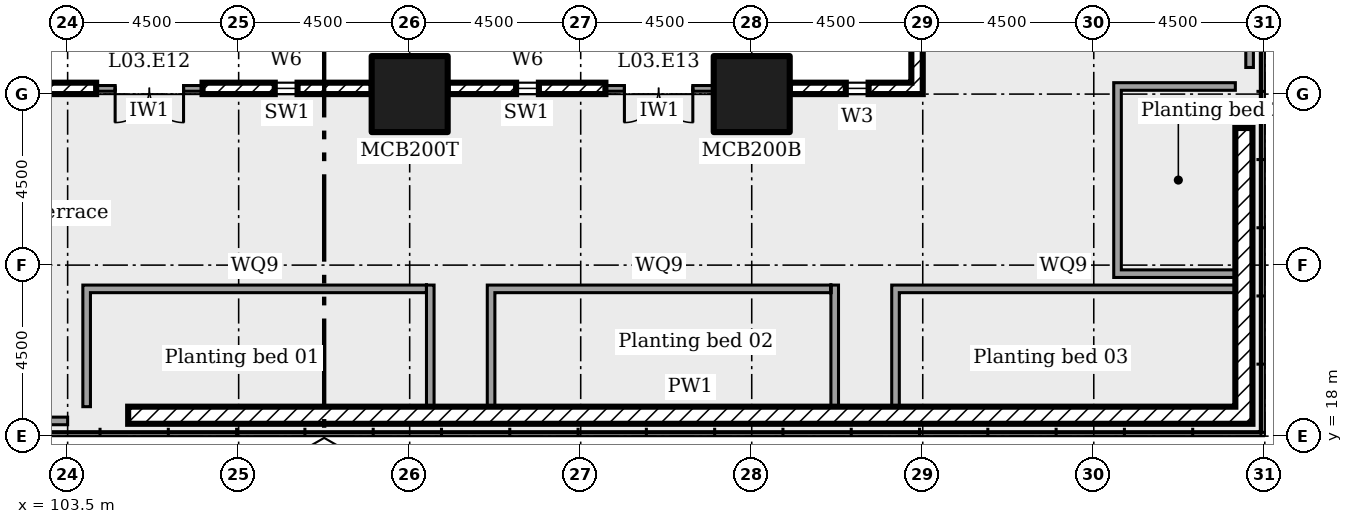
"""IFC4 building model, lengths in metres.
Left out: names, types, materials, properties, quantities, classifications, styles, units other than length and angle.
Written with IfcOpenShell. Run it as: python <this file> out.ifc"""

import sys

from ifc_helpers import new_model, si_unit, direction, frame, frame_2d, origin, origin_2d, place, context, subcontext, project, spatial, rectangle, extrude, element, fill, save


model = new_model("IFC4")
c1 = context("Model", 3, precision=1e-05, world=origin(), true_north=direction((0.0, 1.0)))
c2 = subcontext(c1, "Body", "Model", "MODEL_VIEW")
j1 = project(units=[si_unit("LENGTHUNIT", "METRE"), si_unit("PLANEANGLEUNIT", "RADIAN")], contexts=[c1])
p1 = place(None, origin())
s1 = spatial("IfcSite", under=j1, at=p1, CompositionType="ELEMENT")
p2 = place(p1, origin())
s2 = spatial("IfcBuilding", under=s1, at=p2, CompositionType="ELEMENT")
p3 = place(p2, frame((0.0, 0.0, 16.5)))
s3 = spatial("IfcBuildingStorey", under=s2, at=p3, CompositionType="ELEMENT", Elevation=16.5)
for number, where in (
    (1, (112.5, 27.0, 0.0)),
    (2, (121.5, 27.0, 0.0)),
):
    element("IfcColumn", number, at=place(p3, frame(where)), inside=s3, PredefinedType="COLUMN", context=c2, shape_type="SweptSolid", body=[
        extrude(rectangle(XDim=2.0, YDim=2.0, at=origin_2d()), origin(), (0.0, 0.0, 1.0), 4.5),
    ])
p4 = place(p3, frame((100.0, 27.15, 0.0)))
e3 = element("IfcWall", 3, at=p4, inside=s3, PredefinedType="ELEMENTEDWALL", context=c2, shape_type="SweptSolid", body=[
    extrude(rectangle(XDim=4.25, YDim=0.3, at=frame_2d((2.125, 0.0))), origin(), (0.0, 0.0, 1.0), 2.25),
])
p5 = place(p4, frame((1.85, 0.0, 0.45)))
e4 = element("IfcOpeningElement", 4, at=p5, cuts=e3, PredefinedType="OPENING", context=c2, shape_type="SweptSolid", body=[
    extrude(rectangle(XDim=0.6, YDim=1.7, at=frame_2d((0.3, 0.85))), frame((0.0, 0.16, 0.0), z_axis=(0.0, -1.0, 0.0), x_axis=(1.0, 0.0, 0.0)), (0.0, 0.0, 1.0), 0.32),
])
p6 = place(p3, frame((104.25, 27.15, 0.0)))
e5 = element("IfcWall", 5, at=p6, inside=s3, PredefinedType="SOLIDWALL", context=c2, shape_type="SweptSolid", body=[
    extrude(rectangle(XDim=2.8, YDim=0.15, at=frame_2d((1.4, 0.0))), origin(), (0.0, 0.0, 1.0), 2.25),
])
p7 = place(p6, frame((0.5, 0.0, 0.0)))
e6 = element("IfcOpeningElement", 6, at=p7, cuts=e5, PredefinedType="OPENING", context=c2, shape_type="SweptSolid", body=[
    extrude(rectangle(XDim=1.8, YDim=2.1, at=frame_2d((0.9, 1.05))), frame((0.0, 0.085, 0.0), z_axis=(0.0, -1.0, 0.0), x_axis=(1.0, 0.0, 0.0)), (0.0, 0.0, 1.0), 0.17),
])
p8 = place(p3, frame((107.05, 27.15, 0.0)))
e7 = element("IfcWall", 7, at=p8, inside=s3, PredefinedType="ELEMENTEDWALL", context=c2, shape_type="SweptSolid", body=[
    extrude(rectangle(XDim=4.45, YDim=0.3, at=frame_2d((2.225, 0.0))), origin(), (0.0, 0.0, 1.0), 2.25),
])
p9 = place(p8, frame((1.9, 0.0, 0.45)))
e8 = element("IfcOpeningElement", 8, at=p9, cuts=e7, PredefinedType="OPENING", context=c2, shape_type="SweptSolid", body=[
    extrude(rectangle(XDim=0.6, YDim=1.7, at=frame_2d((0.3, 0.85))), frame((0.0, 0.16, 0.0), z_axis=(0.0, -1.0, 0.0), x_axis=(1.0, 0.0, 0.0)), (0.0, 0.0, 1.0), 0.32),
])
p10 = place(p3, frame((113.5, 27.15, 0.0)))
e9 = element("IfcWall", 9, at=p10, inside=s3, PredefinedType="ELEMENTEDWALL", context=c2, shape_type="SweptSolid", body=[
    extrude(rectangle(XDim=4.15, YDim=0.3, at=frame_2d((2.075, 0.0))), origin(), (0.0, 0.0, 1.0), 2.25),
])
p11 = place(p10, frame((1.8, 0.0, 0.45)))
e10 = element("IfcOpeningElement", 10, at=p11, cuts=e9, PredefinedType="OPENING", context=c2, shape_type="SweptSolid", body=[
    extrude(rectangle(XDim=0.6, YDim=1.7, at=frame_2d((0.3, 0.85))), frame((0.0, 0.16, 0.0), z_axis=(0.0, -1.0, 0.0), x_axis=(1.0, 0.0, 0.0)), (0.0, 0.0, 1.0), 0.32),
])
p12 = place(p3, frame((117.65, 27.15, 0.0)))
e11 = element("IfcWall", 11, at=p12, inside=s3, PredefinedType="SOLIDWALL", context=c2, shape_type="SweptSolid", body=[
    extrude(rectangle(XDim=2.85, YDim=0.15, at=frame_2d((1.425, 0.0))), origin(), (0.0, 0.0, 1.0), 2.25),
])
p13 = place(p12, frame((0.5, 0.0, 0.0)))
e12 = element("IfcOpeningElement", 12, at=p13, cuts=e11, PredefinedType="OPENING", context=c2, shape_type="SweptSolid", body=[
    extrude(rectangle(XDim=1.8, YDim=2.1, at=frame_2d((0.9, 1.05))), frame((0.0, 0.085, 0.0), z_axis=(0.0, -1.0, 0.0), x_axis=(1.0, 0.0, 0.0)), (0.0, 0.0, 1.0), 0.17),
])
p14 = place(p3, frame((122.5, 27.15, 0.0)))
e13 = element("IfcWall", 13, at=p14, inside=s3, PredefinedType="ELEMENTEDWALL", context=c2, shape_type="SweptSolid", body=[
    extrude(rectangle(XDim=3.2, YDim=0.3, at=frame_2d((1.6, 0.0))), origin(), (0.0, 0.0, 1.0), 4.05),
])
p15 = place(p14, frame((1.475, 0.0, 0.45)))
e14 = element("IfcOpeningElement", 14, at=p15, cuts=e13, PredefinedType="OPENING", context=c2, shape_type="SweptSolid", body=[
    extrude(rectangle(XDim=0.6, YDim=2.4, at=frame_2d((0.3, 1.2))), frame((0.0, 0.16, 0.0), z_axis=(0.0, -1.0, 0.0), x_axis=(1.0, 0.0, 0.0)), (0.0, 0.0, 1.0), 0.32),
])
p16 = place(p3, frame((125.85, 27.0, 0.0), z_axis=(0.0, 0.0, 1.0), x_axis=(0.0, 1.0, 0.0)))
e15 = element("IfcWall", 15, at=p16, inside=s3, PredefinedType="ELEMENTEDWALL", context=c2, shape_type="SweptSolid", body=[
    extrude(rectangle(XDim=3.5, YDim=0.3, at=frame_2d((1.75, 0.0))), origin(), (0.0, 0.0, 1.0), 4.05),
])
p17 = place(p16, frame((1.575, 0.0, 0.45)))
e16 = element("IfcOpeningElement", 16, at=p17, cuts=e15, PredefinedType="OPENING", context=c2, shape_type="SweptSolid", body=[
    extrude(rectangle(XDim=0.6, YDim=2.4, at=frame_2d((0.3, 1.2))), frame((0.0, 0.16, 0.0), z_axis=(0.0, -1.0, 0.0), x_axis=(1.0, 0.0, 0.0)), (0.0, 0.0, 1.0), 0.32),
])
p18 = place(p3, frame((105.093, 18.55, 0.0)))
e17 = element("IfcWall", 17, at=p18, inside=s3, PredefinedType="SOLIDWALL", context=c2, shape_type="SweptSolid", body=[
    extrude(rectangle(XDim=29.583, YDim=0.45, at=frame_2d((14.791, 0.0))), origin(), (0.0, 0.0, 1.0), 0.6),
])
p19 = place(p3, frame((134.45, 18.775, 0.0), z_axis=(0.0, 0.0, 1.0), x_axis=(0.0, 1.0, 0.0)))
e18 = element("IfcWall", 18, at=p19, inside=s3, PredefinedType="SOLIDWALL", context=c2, shape_type="SweptSolid", body=[
    extrude(rectangle(XDim=7.333, YDim=0.45, at=frame_2d((3.666, 0.0))), origin(), (0.0, 0.0, 1.0), 0.6),
])
p20 = place(p3, frame((113.042, 18.775, 0.0), z_axis=(0.0, 0.0, 1.0), x_axis=(0.0, 1.0, 0.0)))
e19 = element("IfcWall", 19, at=p20, inside=s3, PredefinedType="SOLIDWALL", context=c2, shape_type="SweptSolid", body=[
    extrude(rectangle(XDim=3.2, YDim=0.2, at=frame_2d((1.6, 0.0))), origin(), (0.0, 0.0, 1.0), 0.45),
])
p21 = place(p3, frame((103.9, 21.875, 0.0)))
e20 = element("IfcWall", 20, at=p21, inside=s3, PredefinedType="SOLIDWALL", context=c2, shape_type="SweptSolid", body=[
    extrude(rectangle(XDim=9.042, YDim=0.2, at=frame_2d((4.521, 0.0))), origin(), (0.0, 0.0, 1.0), 0.45),
])
p22 = place(p3, frame((104.0, 18.775, 0.0), z_axis=(0.0, 0.0, 1.0), x_axis=(0.0, 1.0, 0.0)))
e21 = element("IfcWall", 21, at=p22, inside=s3, PredefinedType="SOLIDWALL", context=c2, shape_type="SweptSolid", body=[
    extrude(rectangle(XDim=3.0, YDim=0.2, at=frame_2d((1.5, 0.0))), origin(), (0.0, 0.0, 1.0), 0.45),
])
p23 = place(p3, frame((123.683, 18.775, 0.0), z_axis=(0.0, 0.0, 1.0), x_axis=(0.0, 1.0, 0.0)))
e22 = element("IfcWall", 22, at=p23, inside=s3, PredefinedType="SOLIDWALL", context=c2, shape_type="SweptSolid", body=[
    extrude(rectangle(XDim=3.2, YDim=0.2, at=frame_2d((1.6, 0.0))), origin(), (0.0, 0.0, 1.0), 0.45),
])
p24 = place(p3, frame((114.542, 21.875, 0.0)))
e23 = element("IfcWall", 23, at=p24, inside=s3, PredefinedType="SOLIDWALL", context=c2, shape_type="SweptSolid", body=[
    extrude(rectangle(XDim=9.042, YDim=0.2, at=frame_2d((4.521, 0.0))), origin(), (0.0, 0.0, 1.0), 0.45),
])
p25 = place(p3, frame((114.642, 18.775, 0.0), z_axis=(0.0, 0.0, 1.0), x_axis=(0.0, 1.0, 0.0)))
e24 = element("IfcWall", 24, at=p25, inside=s3, PredefinedType="SOLIDWALL", context=c2, shape_type="SweptSolid", body=[
    extrude(rectangle(XDim=3.0, YDim=0.2, at=frame_2d((1.5, 0.0))), origin(), (0.0, 0.0, 1.0), 0.45),
])
p26 = place(p3, frame((125.183, 21.875, 0.0)))
e25 = element("IfcWall", 25, at=p26, inside=s3, PredefinedType="SOLIDWALL", context=c2, shape_type="SweptSolid", body=[
    extrude(rectangle(XDim=9.042, YDim=0.2, at=frame_2d((4.521, 0.0))), origin(), (0.0, 0.0, 1.0), 0.45),
])
p27 = place(p3, frame((125.283, 18.775, 0.0), z_axis=(0.0, 0.0, 1.0), x_axis=(0.0, 1.0, 0.0)))
e26 = element("IfcWall", 26, at=p27, inside=s3, PredefinedType="SOLIDWALL", context=c2, shape_type="SweptSolid", body=[
    extrude(rectangle(XDim=3.0, YDim=0.2, at=frame_2d((1.5, 0.0))), origin(), (0.0, 0.0, 1.0), 0.45),
])
for number, where in (
    (27, (131.025, 27.2, 0.0)),
    (28, (131.025, 22.275, 0.0)),
):
    element("IfcWall", number, at=place(p3, frame(where)), inside=s3, PredefinedType="SOLIDWALL", context=c2, shape_type="SweptSolid", body=[
        extrude(rectangle(XDim=3.2, YDim=0.2, at=frame_2d((1.6, 0.0))), origin(), (0.0, 0.0, 1.0), 0.45),
    ])
p28 = place(p3, frame((131.125, 22.375, 0.0), z_axis=(0.0, 0.0, 1.0), x_axis=(0.0, 1.0, 0.0)))
e29 = element("IfcWall", 29, at=p28, inside=s3, PredefinedType="SOLIDWALL", context=c2, shape_type="SweptSolid", body=[
    extrude(rectangle(XDim=4.725, YDim=0.2, at=frame_2d((2.363, 0.0))), origin(), (0.0, 0.0, 1.0), 0.45),
])
p29 = place(p3, frame((99.7, 18.4, 0.0)))
e30 = element("IfcWall", 30, at=p29, inside=s3, PredefinedType="SOLIDWALL", context=c2, shape_type="SweptSolid", body=[
    extrude(rectangle(XDim=3.8, YDim=0.2, at=frame_2d((1.9, 0.0))), origin(), (0.0, 0.0, 1.0), 2.3),
])
p30 = place(p29, frame((0.6, 0.0, 0.0)))
e31 = element("IfcOpeningElement", 31, at=p30, cuts=e30, PredefinedType="OPENING", context=c2, shape_type="SweptSolid", body=[
    extrude(rectangle(XDim=2.6, YDim=2.1, at=frame_2d((1.3, 1.05))), frame((0.0, 0.11, 0.0), z_axis=(0.0, -1.0, 0.0), x_axis=(1.0, 0.0, 0.0)), (0.0, 0.0, 1.0), 0.22),
])
p31 = place(p3, frame((134.6, 27.7, 0.0), z_axis=(0.0, 0.0, 1.0), x_axis=(0.0, 1.0, 0.0)))
e32 = element("IfcWall", 32, at=p31, inside=s3, PredefinedType="SOLIDWALL", context=c2, shape_type="SweptSolid", body=[
    extrude(rectangle(XDim=3.8, YDim=0.2, at=frame_2d((1.9, 0.0))), origin(), (0.0, 0.0, 1.0), 2.3),
])
p32 = place(p31, frame((0.6, 0.0, 0.0)))
e33 = element("IfcOpeningElement", 33, at=p32, cuts=e32, PredefinedType="OPENING", context=c2, shape_type="SweptSolid", body=[
    extrude(rectangle(XDim=2.6, YDim=2.1, at=frame_2d((1.3, 1.05))), frame((0.0, 0.11, 0.0), z_axis=(0.0, -1.0, 0.0), x_axis=(1.0, 0.0, 0.0)), (0.0, 0.0, 1.0), 0.22),
])
p33 = place(p7, frame((1.8, 0.0, 0.0), x_axis=(-1.0, 0.0, 0.0)))
e34 = element("IfcDoor", 34, at=p33, inside=s3, OperationType="DOUBLE_DOOR_DOUBLE_SWING", PredefinedType="NOTDEFINED", context=c2, shape_type="SweptSolid", body=[
    extrude(rectangle(XDim=1.8, YDim=2.1, at=frame_2d((0.9, 1.05))), frame((0.0, 0.025, 0.0), z_axis=(0.0, -1.0, 0.0), x_axis=(1.0, 0.0, 0.0)), (0.0, 0.0, 1.0), 0.05),
])
fill(e6, e34)
p34 = place(p9, origin())
e35 = element("IfcWindow", 35, at=p34, inside=s3, PartitioningType="SINGLE_PANEL", PredefinedType="WINDOW", context=c2, shape_type="SweptSolid", body=[
    extrude(rectangle(XDim=0.6, YDim=1.7, at=frame_2d((0.3, 0.85))), frame((0.0, 0.03, 0.0), z_axis=(0.0, -1.0, 0.0), x_axis=(1.0, 0.0, 0.0)), (0.0, 0.0, 1.0), 0.06),
])
fill(e8, e35)
p35 = place(p11, origin())
e36 = element("IfcWindow", 36, at=p35, inside=s3, PartitioningType="SINGLE_PANEL", PredefinedType="WINDOW", context=c2, shape_type="SweptSolid", body=[
    extrude(rectangle(XDim=0.6, YDim=1.7, at=frame_2d((0.3, 0.85))), frame((0.0, 0.03, 0.0), z_axis=(0.0, -1.0, 0.0), x_axis=(1.0, 0.0, 0.0)), (0.0, 0.0, 1.0), 0.06),
])
fill(e10, e36)
p36 = place(p13, frame((1.8, 0.0, 0.0), x_axis=(-1.0, 0.0, 0.0)))
e37 = element("IfcDoor", 37, at=p36, inside=s3, OperationType="DOUBLE_DOOR_DOUBLE_SWING", PredefinedType="NOTDEFINED", context=c2, shape_type="SweptSolid", body=[
    extrude(rectangle(XDim=1.8, YDim=2.1, at=frame_2d((0.9, 1.05))), frame((0.0, 0.025, 0.0), z_axis=(0.0, -1.0, 0.0), x_axis=(1.0, 0.0, 0.0)), (0.0, 0.0, 1.0), 0.05),
])
fill(e12, e37)
p37 = place(p15, origin())
e38 = element("IfcWindow", 38, at=p37, inside=s3, PartitioningType="SINGLE_PANEL", PredefinedType="WINDOW", context=c2, shape_type="SweptSolid", body=[
    extrude(rectangle(XDim=0.6, YDim=2.4, at=frame_2d((0.3, 1.2))), frame((0.0, 0.03, 0.0), z_axis=(0.0, -1.0, 0.0), x_axis=(1.0, 0.0, 0.0)), (0.0, 0.0, 1.0), 0.06),
])
fill(e14, e38)
save(model, sys.argv[1])
